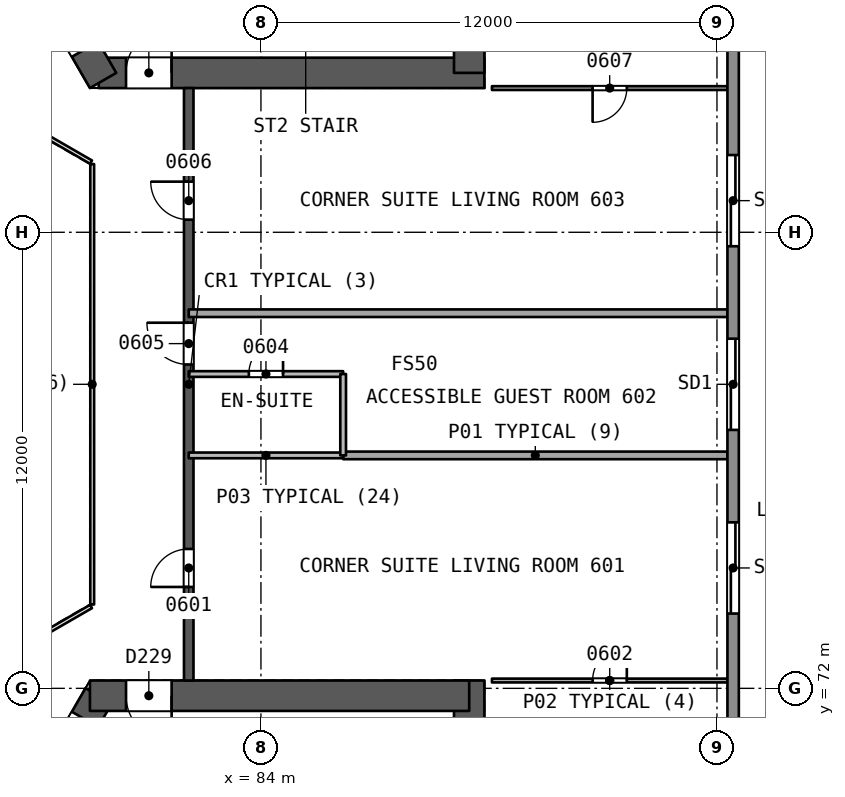
"""IFC4 building model, lengths in metres.
Left out: names, types, materials, properties, quantities, classifications, styles, units other than length and angle.
Written with IfcOpenShell. Run it as: python <this file> out.ifc"""

import sys

from ifc_helpers import new_model, si_unit, direction, frame, frame_2d, origin, place, context, subcontext, project, spatial, rectangle, extrude, element, fill, save


model = new_model("IFC4")
c1 = context("Model", 3, precision=1e-05, world=origin(), true_north=direction((0.0, 1.0)))
c2 = subcontext(c1, "Body", "Model", "MODEL_VIEW")
j1 = project(units=[si_unit("LENGTHUNIT", "METRE"), si_unit("PLANEANGLEUNIT", "RADIAN")], contexts=[c1])
p1 = place(None, origin())
s1 = spatial("IfcSite", under=j1, at=p1, CompositionType="ELEMENT")
p2 = place(p1, origin())
s2 = spatial("IfcBuilding", under=s1, at=p2, CompositionType="ELEMENT")
p3 = place(p2, frame((0.0, 0.0, 33.7)))
s3 = spatial("IfcBuildingStorey", under=s2, at=p3, CompositionType="ELEMENT", Elevation=33.7)
p4 = place(p3, frame((79.731, 88.194, 0.0), z_axis=(0.0, 0.0, 1.0), x_axis=(1.0, 0.0, 0.0)))
e1 = element("IfcWall", 1, at=p4, inside=s3, PredefinedType="SHEAR", context=c2, shape_type="SweptSolid", body=[
    extrude(rectangle(XDim=10.149, YDim=0.8, at=frame_2d((5.074, 0.0))), origin(), (0.0, 0.0, 1.0), 3.7),
])
p5 = place(p4, frame((0.719, 0.0, 0.0)))
e2 = element("IfcOpeningElement", 2, at=p5, cuts=e1, PredefinedType="OPENING", context=c2, shape_type="SweptSolid", body=[
    extrude(rectangle(XDim=1.2, YDim=2.1, at=frame_2d((0.6, 1.05))), frame((0.0, 0.411, 0.0), z_axis=(0.0, -1.0, 0.0), x_axis=(1.0, 0.0, 0.0)), (0.0, 0.0, 1.0), 0.821),
])
p6 = place(p3, frame((89.48, 88.194, 0.0), z_axis=(0.0, 0.0, 1.0), x_axis=(0.0, 1.0, 0.0)))
e3 = element("IfcWall", 3, at=p6, inside=s3, PredefinedType="SHEAR", context=c2, shape_type="SweptSolid", body=[
    extrude(rectangle(XDim=13.933, YDim=0.8, at=frame_2d((6.967, 0.0))), origin(), (0.0, 0.0, 1.0), 3.7),
])
p7 = place(p3, frame((74.856, 96.637, 0.0), z_axis=(0.0, 0.0, 1.0), x_axis=(0.499993500917, -0.866029155999, 0.0)))
e4 = element("IfcWall", 4, at=p7, inside=s3, PredefinedType="SHEAR", context=c2, shape_type="SweptSolid", body=[
    extrude(rectangle(XDim=9.98, YDim=0.8, at=frame_2d((4.99, 0.0))), origin(), (0.0, 0.0, 1.0), 3.7),
])
p8 = place(p7, frame((7.83, 0.0, 0.0)))
e5 = element("IfcOpeningElement", 5, at=p8, cuts=e4, PredefinedType="OPENING", context=c2, shape_type="SweptSolid", body=[
    extrude(rectangle(XDim=1.2, YDim=2.1, at=frame_2d((0.6, 1.05))), frame((0.0, 0.411, 0.0), z_axis=(0.0, -1.0, 0.0), x_axis=(1.0, 0.0, 0.0)), (0.0, 0.0, 1.0), 0.821),
])
p9 = place(p3, frame((79.731, 71.806, 0.0), z_axis=(0.0, 0.0, 1.0), x_axis=(-0.49999662545, -0.866027352073, 0.0)))
e6 = element("IfcWall", 6, at=p9, inside=s3, PredefinedType="SHEAR", context=c2, shape_type="SweptSolid", body=[
    extrude(rectangle(XDim=10.149, YDim=0.8, at=frame_2d((5.074, 0.0))), origin(), (0.0, 0.0, 1.0), 3.7),
])
p10 = place(p9, frame((0.719, 0.0, 0.0)))
e7 = element("IfcOpeningElement", 7, at=p10, cuts=e6, PredefinedType="OPENING", context=c2, shape_type="SweptSolid", body=[
    extrude(rectangle(XDim=1.2, YDim=2.1, at=frame_2d((0.6, 1.05))), frame((0.0, 0.411, 0.0), z_axis=(0.0, -1.0, 0.0), x_axis=(1.0, 0.0, 0.0)), (0.0, 0.0, 1.0), 0.821),
])
p11 = place(p3, frame((89.48, 58.103, 0.0), z_axis=(0.0, 0.0, 1.0), x_axis=(0.0, 1.0, 0.0)))
e8 = element("IfcWall", 8, at=p11, inside=s3, PredefinedType="SHEAR", context=c2, shape_type="SweptSolid", body=[
    extrude(rectangle(XDim=14.103, YDim=0.8, at=frame_2d((7.051, 0.0))), origin(), (0.0, 0.0, 1.0), 3.7),
])
p12 = place(p3, frame((89.48, 71.806, 0.0), z_axis=(0.0, 0.0, 1.0), x_axis=(-1.0, 0.0, 0.0)))
e9 = element("IfcWall", 9, at=p12, inside=s3, PredefinedType="SHEAR", context=c2, shape_type="SweptSolid", body=[
    extrude(rectangle(XDim=9.98, YDim=0.8, at=frame_2d((4.99, 0.0))), origin(), (0.0, 0.0, 1.0), 3.7),
])
p13 = place(p12, frame((7.83, 0.0, 0.0)))
e10 = element("IfcOpeningElement", 10, at=p13, cuts=e9, PredefinedType="OPENING", context=c2, shape_type="SweptSolid", body=[
    extrude(rectangle(XDim=1.2, YDim=2.1, at=frame_2d((0.6, 1.05))), frame((0.0, 0.411, 0.0), z_axis=(0.0, -1.0, 0.0), x_axis=(1.0, 0.0, 0.0)), (0.0, 0.0, 1.0), 0.821),
])
p14 = place(p3, frame((82.1, 72.206, 0.0), z_axis=(0.0, 0.0, 1.0), x_axis=(0.0, 1.0, 0.0)))
e11 = element("IfcWall", 11, at=p14, inside=s3, PredefinedType="SHEAR", context=c2, shape_type="SweptSolid", body=[
    extrude(rectangle(XDim=15.588, YDim=0.25, at=frame_2d((7.794, 0.0))), origin(), (0.0, 0.0, 1.0), 3.2),
])
p15 = place(p14, frame((2.462, 0.0, 0.0)))
e12 = element("IfcOpeningElement", 12, at=p15, cuts=e11, PredefinedType="OPENING", context=c2, shape_type="SweptSolid", body=[
    extrude(rectangle(XDim=1.0, YDim=2.1, at=frame_2d((0.5, 1.05))), frame((0.0, 0.135, 0.0), z_axis=(0.0, -1.0, 0.0), x_axis=(1.0, 0.0, 0.0)), (0.0, 0.0, 1.0), 0.271),
])
p16 = place(p14, frame((8.315, 0.0, 0.0)))
e13 = element("IfcOpeningElement", 13, at=p16, cuts=e11, PredefinedType="OPENING", context=c2, shape_type="SweptSolid", body=[
    extrude(rectangle(XDim=1.1, YDim=2.1, at=frame_2d((0.55, 1.05))), frame((0.0, 0.135, 0.0), z_axis=(0.0, -1.0, 0.0), x_axis=(1.0, 0.0, 0.0)), (0.0, 0.0, 1.0), 0.271),
])
p17 = place(p14, frame((12.127, 0.0, 0.0)))
e14 = element("IfcOpeningElement", 14, at=p17, cuts=e11, PredefinedType="OPENING", context=c2, shape_type="SweptSolid", body=[
    extrude(rectangle(XDim=1.0, YDim=2.1, at=frame_2d((0.5, 1.05))), frame((0.0, 0.135, 0.0), z_axis=(0.0, -1.0, 0.0), x_axis=(1.0, 0.0, 0.0)), (0.0, 0.0, 1.0), 0.271),
])
p18 = place(p3, frame((90.079, 72.206, 0.0), z_axis=(0.0, 0.0, 1.0), x_axis=(1.0, 0.0, 0.0)))
e15 = element("IfcWall", 15, at=p18, inside=s3, PredefinedType="PARTITIONING", context=c2, shape_type="SweptSolid", body=[
    extrude(rectangle(XDim=6.197, YDim=0.1, at=frame_2d((3.099, 0.0))), origin(), (0.0, 0.0, 1.0), 3.2),
])
p19 = place(p18, frame((2.649, 0.0, 0.0)))
e16 = element("IfcOpeningElement", 16, at=p19, cuts=e15, PredefinedType="OPENING", context=c2, shape_type="SweptSolid", body=[
    extrude(rectangle(XDim=0.9, YDim=2.1, at=frame_2d((0.45, 1.05))), frame((0.0, 0.061, 0.0), z_axis=(0.0, -1.0, 0.0), x_axis=(1.0, 0.0, 0.0)), (0.0, 0.0, 1.0), 0.121),
])
p20 = place(p3, frame((96.276, 78.129, 0.0), z_axis=(0.0, 0.0, 1.0), x_axis=(-1.0, 0.0, 0.0)))
e17 = element("IfcWall", 17, at=p20, inside=s3, PredefinedType="PARTITIONING", context=c2, shape_type="SweptSolid", body=[
    extrude(rectangle(XDim=10.113, YDim=0.2, at=frame_2d((5.057, 0.0))), origin(), (0.0, 0.0, 1.0), 3.2),
])
p21 = place(p3, frame((86.163, 78.129, 0.0), z_axis=(0.0, 0.0, 1.0), x_axis=(-1.0, 0.0, 0.0)))
e18 = element("IfcWall", 18, at=p21, inside=s3, PredefinedType="PARTITIONING", context=c2, shape_type="SweptSolid", body=[
    extrude(rectangle(XDim=4.063, YDim=0.15, at=frame_2d((2.031, 0.0))), origin(), (0.0, 0.0, 1.0), 3.2),
])
p22 = place(p3, frame((82.1, 80.271, 0.0), z_axis=(0.0, 0.0, 1.0), x_axis=(1.0, 0.0, 0.0)))
e19 = element("IfcWall", 19, at=p22, inside=s3, PredefinedType="PARTITIONING", context=c2, shape_type="SweptSolid", body=[
    extrude(rectangle(XDim=4.063, YDim=0.15, at=frame_2d((2.031, 0.0))), origin(), (0.0, 0.0, 1.0), 3.2),
])
p23 = place(p22, frame((1.582, 0.0, 0.0)))
e20 = element("IfcOpeningElement", 20, at=p23, cuts=e19, PredefinedType="OPENING", context=c2, shape_type="SweptSolid", body=[
    extrude(rectangle(XDim=0.9, YDim=2.1, at=frame_2d((0.45, 1.05))), frame((0.0, 0.085, 0.0), z_axis=(0.0, -1.0, 0.0), x_axis=(1.0, 0.0, 0.0)), (0.0, 0.0, 1.0), 0.171),
])
p24 = place(p3, frame((86.163, 80.271, 0.0), z_axis=(0.0, 0.0, 1.0), x_axis=(0.0, -1.0, 0.0)))
e21 = element("IfcWall", 21, at=p24, inside=s3, PredefinedType="PARTITIONING", context=c2, shape_type="SweptSolid", body=[
    extrude(rectangle(XDim=2.141, YDim=0.15, at=frame_2d((1.071, 0.0))), origin(), (0.0, 0.0, 1.0), 3.2),
])
p25 = place(p3, frame((96.276, 81.871, 0.0), z_axis=(0.0, 0.0, 1.0), x_axis=(-1.0, 0.0, 0.0)))
e22 = element("IfcWall", 22, at=p25, inside=s3, PredefinedType="PARTITIONING", context=c2, shape_type="SweptSolid", body=[
    extrude(rectangle(XDim=14.176, YDim=0.2, at=frame_2d((7.088, 0.0))), origin(), (0.0, 0.0, 1.0), 3.2),
])
p26 = place(p3, frame((96.276, 87.794, 0.0), z_axis=(0.0, 0.0, 1.0), x_axis=(-1.0, 0.0, 0.0)))
e23 = element("IfcWall", 23, at=p26, inside=s3, PredefinedType="PARTITIONING", context=c2, shape_type="SweptSolid", body=[
    extrude(rectangle(XDim=6.197, YDim=0.1, at=frame_2d((3.099, 0.0))), origin(), (0.0, 0.0, 1.0), 3.2),
])
p27 = place(p26, frame((2.649, 0.0, 0.0)))
e24 = element("IfcOpeningElement", 24, at=p27, cuts=e23, PredefinedType="OPENING", context=c2, shape_type="SweptSolid", body=[
    extrude(rectangle(XDim=0.9, YDim=2.1, at=frame_2d((0.45, 1.05))), frame((0.0, 0.061, 0.0), z_axis=(0.0, -1.0, 0.0), x_axis=(1.0, 0.0, 0.0)), (0.0, 0.0, 1.0), 0.121),
])
p28 = place(p3, frame((96.425, 110.805, 0.0), z_axis=(0.0, 0.0, 1.0), x_axis=(0.0, -1.0, 0.0)))
e25 = element("IfcWall", 25, at=p28, inside=s3, PredefinedType="SOLIDWALL", context=c2, shape_type="SweptSolid", body=[
    extrude(rectangle(XDim=61.61, YDim=0.3, at=frame_2d((30.805, 0.0))), origin(), (0.0, 0.0, 1.0), 3.2),
])
p29 = place(p28, frame((29.605, 0.0, 0.0)))
e26 = element("IfcOpeningElement", 26, at=p29, cuts=e25, PredefinedType="OPENING", context=c2, shape_type="SweptSolid", body=[
    extrude(rectangle(XDim=2.4, YDim=2.4, at=frame_2d((1.2, 1.2))), frame((0.0, 0.161, 0.0), z_axis=(0.0, -1.0, 0.0), x_axis=(1.0, 0.0, 0.0)), (0.0, 0.0, 1.0), 0.321),
])
p30 = place(p28, frame((34.437, 0.0, 0.0)))
e27 = element("IfcOpeningElement", 27, at=p30, cuts=e25, PredefinedType="OPENING", context=c2, shape_type="SweptSolid", body=[
    extrude(rectangle(XDim=2.4, YDim=2.4, at=frame_2d((1.2, 1.2))), frame((0.0, 0.161, 0.0), z_axis=(0.0, -1.0, 0.0), x_axis=(1.0, 0.0, 0.0)), (0.0, 0.0, 1.0), 0.321),
])
p31 = place(p28, frame((47.767, 0.0, 0.0)))
e28 = element("IfcOpeningElement", 28, at=p31, cuts=e25, PredefinedType="OPENING", context=c2, shape_type="SweptSolid", body=[
    extrude(rectangle(XDim=2.4, YDim=2.4, at=frame_2d((1.2, 1.2))), frame((0.0, 0.161, 0.0), z_axis=(0.0, -1.0, 0.0), x_axis=(1.0, 0.0, 0.0)), (0.0, 0.0, 1.0), 0.321),
])
p32 = place(p28, frame((24.772, 0.0, 0.0)))
e29 = element("IfcOpeningElement", 29, at=p32, cuts=e25, PredefinedType="OPENING", context=c2, shape_type="SweptSolid", body=[
    extrude(rectangle(XDim=2.4, YDim=2.4, at=frame_2d((1.2, 1.2))), frame((0.0, 0.161, 0.0), z_axis=(0.0, -1.0, 0.0), x_axis=(1.0, 0.0, 0.0)), (0.0, 0.0, 1.0), 0.321),
])
p33 = place(p28, frame((11.402, 0.0, 0.0)))
e30 = element("IfcOpeningElement", 30, at=p33, cuts=e25, PredefinedType="OPENING", context=c2, shape_type="SweptSolid", body=[
    extrude(rectangle(XDim=2.4, YDim=2.4, at=frame_2d((1.2, 1.2))), frame((0.0, 0.161, 0.0), z_axis=(0.0, -1.0, 0.0), x_axis=(1.0, 0.0, 0.0)), (0.0, 0.0, 1.0), 0.321),
])
p34 = place(p3, frame((37.61, 83.152, 0.0), z_axis=(0.0, 0.0, 1.0), x_axis=(0.866024438126, 0.500001672566, 0.0)))
e31 = element("IfcWall", 31, at=p34, inside=s3, PredefinedType="SOLIDWALL", context=c2, shape_type="SweptSolid", body=[
    extrude(rectangle(XDim=61.61, YDim=0.3, at=frame_2d((30.805, 0.0))), origin(), (0.0, 0.0, 1.0), 3.2),
])
p35 = place(p34, frame((34.281, 0.0, 0.0)))
e32 = element("IfcOpeningElement", 32, at=p35, cuts=e31, PredefinedType="OPENING", context=c2, shape_type="SweptSolid", body=[
    extrude(rectangle(XDim=2.4, YDim=2.4, at=frame_2d((1.2, 1.2))), frame((0.0, 0.161, 0.0), z_axis=(0.0, -1.0, 0.0), x_axis=(1.0, 0.0, 0.0)), (0.0, 0.0, 1.0), 0.321),
])
p36 = place(p34, frame((47.767, 0.0, 0.0)))
e33 = element("IfcOpeningElement", 33, at=p36, cuts=e31, PredefinedType="OPENING", context=c2, shape_type="SweptSolid", body=[
    extrude(rectangle(XDim=2.4, YDim=2.4, at=frame_2d((1.2, 1.2))), frame((0.0, 0.161, 0.0), z_axis=(0.0, -1.0, 0.0), x_axis=(1.0, 0.0, 0.0)), (0.0, 0.0, 1.0), 0.321),
])
p37 = place(p34, frame((24.305, 0.0, 0.0)))
e34 = element("IfcOpeningElement", 34, at=p37, cuts=e31, PredefinedType="OPENING", context=c2, shape_type="SweptSolid", body=[
    extrude(rectangle(XDim=2.4, YDim=2.4, at=frame_2d((1.2, 1.2))), frame((0.0, 0.161, 0.0), z_axis=(0.0, -1.0, 0.0), x_axis=(1.0, 0.0, 0.0)), (0.0, 0.0, 1.0), 0.321),
])
p38 = place(p34, frame((11.402, 0.0, 0.0)))
e35 = element("IfcOpeningElement", 35, at=p38, cuts=e31, PredefinedType="OPENING", context=c2, shape_type="SweptSolid", body=[
    extrude(rectangle(XDim=2.4, YDim=2.4, at=frame_2d((1.2, 1.2))), frame((0.0, 0.161, 0.0), z_axis=(0.0, -1.0, 0.0), x_axis=(1.0, 0.0, 0.0)), (0.0, 0.0, 1.0), 0.321),
])
p39 = place(p34, frame((28.981, 0.0, 0.0)))
e36 = element("IfcOpeningElement", 36, at=p39, cuts=e31, PredefinedType="OPENING", context=c2, shape_type="SweptSolid", body=[
    extrude(rectangle(XDim=2.4, YDim=2.4, at=frame_2d((1.2, 1.2))), frame((0.0, 0.161, 0.0), z_axis=(0.0, -1.0, 0.0), x_axis=(1.0, 0.0, 0.0)), (0.0, 0.0, 1.0), 0.321),
])
p40 = place(p3, frame((90.965, 46.043, 0.0), z_axis=(0.0, 0.0, 1.0), x_axis=(-0.866024438126, 0.500001672566, 0.0)))
e37 = element("IfcWall", 37, at=p40, inside=s3, PredefinedType="SOLIDWALL", context=c2, shape_type="SweptSolid", body=[
    extrude(rectangle(XDim=61.61, YDim=0.3, at=frame_2d((30.805, 0.0))), origin(), (0.0, 0.0, 1.0), 3.2),
])
p41 = place(p40, frame((29.293, 0.0, 0.0)))
e38 = element("IfcOpeningElement", 38, at=p41, cuts=e37, PredefinedType="OPENING", context=c2, shape_type="SweptSolid", body=[
    extrude(rectangle(XDim=2.4, YDim=2.4, at=frame_2d((1.2, 1.2))), frame((0.0, 0.161, 0.0), z_axis=(0.0, -1.0, 0.0), x_axis=(1.0, 0.0, 0.0)), (0.0, 0.0, 1.0), 0.321),
])
p42 = place(p40, frame((46.61, 0.0, 0.0)))
e39 = element("IfcOpeningElement", 39, at=p42, cuts=e37, PredefinedType="OPENING", context=c2, shape_type="SweptSolid", body=[
    extrude(rectangle(XDim=2.4, YDim=2.4, at=frame_2d((1.2, 1.2))), frame((0.0, 0.161, 0.0), z_axis=(0.0, -1.0, 0.0), x_axis=(1.0, 0.0, 0.0)), (0.0, 0.0, 1.0), 0.321),
])
p43 = place(p40, frame((12.289, 0.0, 0.0)))
e40 = element("IfcOpeningElement", 40, at=p43, cuts=e37, PredefinedType="OPENING", context=c2, shape_type="SweptSolid", body=[
    extrude(rectangle(XDim=2.4, YDim=2.4, at=frame_2d((1.2, 1.2))), frame((0.0, 0.161, 0.0), z_axis=(0.0, -1.0, 0.0), x_axis=(1.0, 0.0, 0.0)), (0.0, 0.0, 1.0), 0.321),
])
p44 = place(p3, frame((79.56, 74.206, 0.0), z_axis=(0.0, 0.0, 1.0), x_axis=(0.0, 1.0, 0.0)))
e41 = element("IfcWall", 41, at=p44, inside=s3, PredefinedType="PARTITIONING", context=c2, shape_type="SweptSolid", body=[
    extrude(rectangle(XDim=11.588, YDim=0.1, at=frame_2d((5.794, 0.0))), origin(), (0.0, 0.0, 1.0), 3.2),
])
for number, where, z_axis, x_axis in (
    (42, (79.53, 85.846, 0.0), (0.0, 0.0, 1.0), (-0.866, 0.5, 0.0)),
    (43, (77.798, 73.154, 0.0), (0.0, 0.0, 1.0), (0.866, 0.5, 0.0)),
):
    element("IfcWall", number, at=place(p3, frame(where, z_axis=z_axis, x_axis=x_axis)), inside=s3, PredefinedType="PARTITIONING", context=c2, shape_type="SweptSolid", body=[
        extrude(rectangle(XDim=2.0, YDim=0.1, at=frame_2d((1.0, 0.0))), origin(), (0.0, 0.0, 1.0), 3.2),
    ])
p45 = place(p15, origin())
e44 = element("IfcDoor", 44, at=p45, inside=s3, OperationType="SINGLE_SWING_LEFT", PredefinedType="NOTDEFINED", context=c2, shape_type="SweptSolid", body=[
    extrude(rectangle(XDim=1.0, YDim=2.1, at=frame_2d((0.5, 1.05))), frame((0.0, 0.025, 0.0), z_axis=(0.0, -1.0, 0.0), x_axis=(1.0, 0.0, 0.0)), (0.0, 0.0, 1.0), 0.05),
])
fill(e12, e44)
p46 = place(p19, origin())
e45 = element("IfcDoor", 45, at=p46, inside=s3, OperationType="SINGLE_SWING_RIGHT", PredefinedType="NOTDEFINED", context=c2, shape_type="SweptSolid", body=[
    extrude(rectangle(XDim=0.9, YDim=2.1, at=frame_2d((0.45, 1.05))), frame((0.0, 0.025, 0.0), z_axis=(0.0, -1.0, 0.0), x_axis=(1.0, 0.0, 0.0)), (0.0, 0.0, 1.0), 0.05),
])
fill(e16, e45)
p47 = place(p23, origin())
e46 = element("IfcDoor", 46, at=p47, inside=s3, OperationType="SINGLE_SWING_RIGHT", PredefinedType="NOTDEFINED", context=c2, shape_type="SweptSolid", body=[
    extrude(rectangle(XDim=0.9, YDim=2.1, at=frame_2d((0.45, 1.05))), frame((0.0, 0.025, 0.0), z_axis=(0.0, -1.0, 0.0), x_axis=(1.0, 0.0, 0.0)), (0.0, 0.0, 1.0), 0.05),
])
fill(e20, e46)
p48 = place(p16, origin())
e47 = element("IfcDoor", 47, at=p48, inside=s3, OperationType="SINGLE_SWING_RIGHT", PredefinedType="NOTDEFINED", context=c2, shape_type="SweptSolid", body=[
    extrude(rectangle(XDim=1.1, YDim=2.1, at=frame_2d((0.55, 1.05))), frame((0.0, 0.025, 0.0), z_axis=(0.0, -1.0, 0.0), x_axis=(1.0, 0.0, 0.0)), (0.0, 0.0, 1.0), 0.05),
])
fill(e13, e47)
p49 = place(p17, origin())
e48 = element("IfcDoor", 48, at=p49, inside=s3, OperationType="SINGLE_SWING_RIGHT", PredefinedType="NOTDEFINED", context=c2, shape_type="SweptSolid", body=[
    extrude(rectangle(XDim=1.0, YDim=2.1, at=frame_2d((0.5, 1.05))), frame((0.0, 0.025, 0.0), z_axis=(0.0, -1.0, 0.0), x_axis=(1.0, 0.0, 0.0)), (0.0, 0.0, 1.0), 0.05),
])
fill(e14, e48)
p50 = place(p27, origin())
e49 = element("IfcDoor", 49, at=p50, inside=s3, OperationType="SINGLE_SWING_RIGHT", PredefinedType="NOTDEFINED", context=c2, shape_type="SweptSolid", body=[
    extrude(rectangle(XDim=0.9, YDim=2.1, at=frame_2d((0.45, 1.05))), frame((0.0, 0.025, 0.0), z_axis=(0.0, -1.0, 0.0), x_axis=(1.0, 0.0, 0.0)), (0.0, 0.0, 1.0), 0.05),
])
fill(e24, e49)
p51 = place(p29, origin())
e50 = element("IfcDoor", 50, at=p51, inside=s3, OperationType="SLIDING_TO_LEFT", PredefinedType="NOTDEFINED", context=c2, shape_type="SweptSolid", body=[
    extrude(rectangle(XDim=2.4, YDim=2.4, at=frame_2d((1.2, 1.2))), frame((0.0, 0.025, 0.0), z_axis=(0.0, -1.0, 0.0), x_axis=(1.0, 0.0, 0.0)), (0.0, 0.0, 1.0), 0.05),
])
fill(e26, e50)
p52 = place(p30, origin())
e51 = element("IfcDoor", 51, at=p52, inside=s3, OperationType="SLIDING_TO_RIGHT", PredefinedType="NOTDEFINED", context=c2, shape_type="SweptSolid", body=[
    extrude(rectangle(XDim=2.4, YDim=2.4, at=frame_2d((1.2, 1.2))), frame((0.0, 0.025, 0.0), z_axis=(0.0, -1.0, 0.0), x_axis=(1.0, 0.0, 0.0)), (0.0, 0.0, 1.0), 0.05),
])
fill(e27, e51)
p53 = place(p32, origin())
e52 = element("IfcDoor", 52, at=p53, inside=s3, OperationType="SLIDING_TO_RIGHT", PredefinedType="NOTDEFINED", context=c2, shape_type="SweptSolid", body=[
    extrude(rectangle(XDim=2.4, YDim=2.4, at=frame_2d((1.2, 1.2))), frame((0.0, 0.025, 0.0), z_axis=(0.0, -1.0, 0.0), x_axis=(1.0, 0.0, 0.0)), (0.0, 0.0, 1.0), 0.05),
])
fill(e29, e52)
p54 = place(p5, origin())
e53 = element("IfcDoor", 53, at=p54, inside=s3, OperationType="SINGLE_SWING_RIGHT", PredefinedType="NOTDEFINED", context=c2, shape_type="SweptSolid", body=[
    extrude(rectangle(XDim=1.2, YDim=2.1, at=frame_2d((0.6, 1.05))), frame((0.0, 0.025, 0.0), z_axis=(0.0, -1.0, 0.0), x_axis=(1.0, 0.0, 0.0)), (0.0, 0.0, 1.0), 0.05),
])
fill(e2, e53)
p55 = place(p13, origin())
e54 = element("IfcDoor", 54, at=p55, inside=s3, OperationType="SINGLE_SWING_LEFT", PredefinedType="NOTDEFINED", context=c2, shape_type="SweptSolid", body=[
    extrude(rectangle(XDim=1.2, YDim=2.1, at=frame_2d((0.6, 1.05))), frame((0.0, 0.025, 0.0), z_axis=(0.0, -1.0, 0.0), x_axis=(1.0, 0.0, 0.0)), (0.0, 0.0, 1.0), 0.05),
])
fill(e10, e54)
save(model, sys.argv[1])
